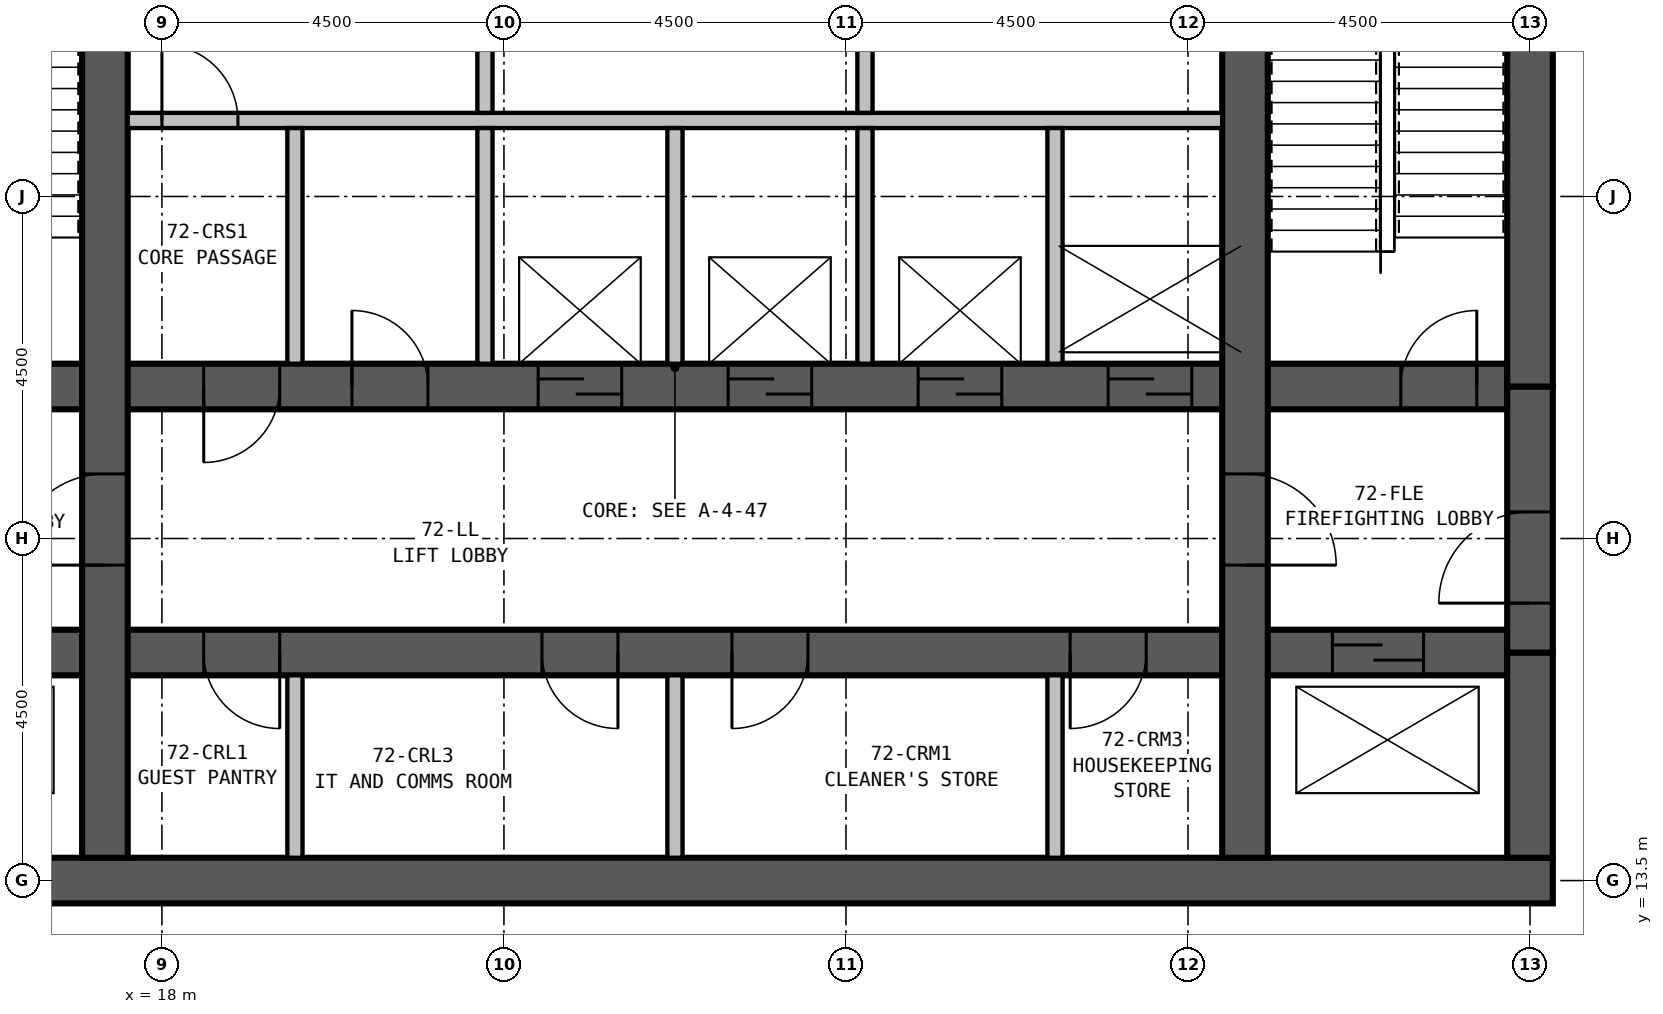
"""IFC4 building model, lengths in metres.
Left out: names, types, materials, properties, quantities, classifications, styles, units other than length and angle.
Written with IfcOpenShell. Run it as: python <this file> out.ifc"""

import sys

from ifc_helpers import new_model, si_unit, direction, frame, frame_2d, origin, place, context, subcontext, project, spatial, rectangle, extrude, element, fill, save


model = new_model("IFC4")
c1 = context("Model", 3, precision=1e-05, world=origin(), true_north=direction((0.0, 1.0)))
c2 = subcontext(c1, "Body", "Model", "MODEL_VIEW")
j1 = project(units=[si_unit("LENGTHUNIT", "METRE"), si_unit("PLANEANGLEUNIT", "RADIAN")], contexts=[c1])
p1 = place(None, origin())
s1 = spatial("IfcSite", under=j1, at=p1, CompositionType="ELEMENT")
p2 = place(p1, origin())
s2 = spatial("IfcBuilding", under=s1, at=p2, CompositionType="ELEMENT")
p3 = place(p2, frame((0.0, 0.0, 281.9)))
s3 = spatial("IfcBuildingStorey", under=s2, at=p3, CompositionType="ELEMENT", Elevation=281.9)
p4 = place(p3, frame((13.2, 13.5, 0.0), z_axis=(0.0, 0.0, 1.0), x_axis=(1.0, 0.0, 0.0)))
e1 = element("IfcWall", 1, at=p4, inside=s3, PredefinedType="SHEAR", context=c2, shape_type="SweptSolid", body=[
    extrude(rectangle(XDim=23.1, YDim=0.6, at=frame_2d((11.55, 0.0))), origin(), (0.0, 0.0, 1.0), 3.9),
])
p5 = place(p3, frame((17.25, 13.8, 0.0), z_axis=(0.0, 0.0, 1.0), x_axis=(0.0, 1.0, 0.0)))
e2 = element("IfcWall", 2, at=p5, inside=s3, PredefinedType="SHEAR", context=c2, shape_type="SweptSolid", body=[
    extrude(rectangle(XDim=12.9, YDim=0.6, at=frame_2d((6.45, 0.0))), origin(), (0.0, 0.0, 1.0), 3.9),
])
p6 = place(p5, frame((3.85, 0.0, 0.0)))
e3 = element("IfcOpeningElement", 3, at=p6, cuts=e2, PredefinedType="OPENING", context=c2, shape_type="SweptSolid", body=[
    extrude(rectangle(XDim=1.2, YDim=2.1, at=frame_2d((0.6, 1.05))), frame((0.0, 0.31, 0.0), z_axis=(0.0, -1.0, 0.0), x_axis=(1.0, 0.0, 0.0)), (0.0, 0.0, 1.0), 0.62),
])
p7 = place(p3, frame((32.25, 13.8, 0.0), z_axis=(0.0, 0.0, 1.0), x_axis=(0.0, 1.0, 0.0)))
e4 = element("IfcWall", 4, at=p7, inside=s3, PredefinedType="SHEAR", context=c2, shape_type="SweptSolid", body=[
    extrude(rectangle(XDim=12.9, YDim=0.6, at=frame_2d((6.45, 0.0))), origin(), (0.0, 0.0, 1.0), 3.9),
])
p8 = place(p7, frame((5.05, 0.0, 0.0), z_axis=(0.0, 0.0, 1.0), x_axis=(-1.0, 0.0, 0.0)))
e5 = element("IfcOpeningElement", 5, at=p8, cuts=e4, PredefinedType="OPENING", context=c2, shape_type="SweptSolid", body=[
    extrude(rectangle(XDim=1.2, YDim=2.1, at=frame_2d((0.6, 1.05))), frame((0.0, 0.31, 0.0), z_axis=(0.0, -1.0, 0.0), x_axis=(1.0, 0.0, 0.0)), (0.0, 0.0, 1.0), 0.62),
])
p9 = place(p3, frame((13.8, 16.5, 0.0), z_axis=(0.0, 0.0, 1.0), x_axis=(1.0, 0.0, 0.0)))
e6 = element("IfcWall", 6, at=p9, inside=s3, PredefinedType="SHEAR", context=c2, shape_type="SweptSolid", body=[
    extrude(rectangle(XDim=21.9, YDim=0.6, at=frame_2d((10.95, 0.0))), origin(), (0.0, 0.0, 1.0), 3.9),
])
p10 = place(p9, frame((5.75, 0.0, 0.0), z_axis=(0.0, 0.0, 1.0), x_axis=(-1.0, 0.0, 0.0)))
e7 = element("IfcOpeningElement", 7, at=p10, cuts=e6, PredefinedType="OPENING", context=c2, shape_type="SweptSolid", body=[
    extrude(rectangle(XDim=1.0, YDim=2.1, at=frame_2d((0.5, 1.05))), frame((0.0, 0.31, 0.0), z_axis=(0.0, -1.0, 0.0), x_axis=(1.0, 0.0, 0.0)), (0.0, 0.0, 1.0), 0.62),
])
p11 = place(p9, frame((10.2, 0.0, 0.0), z_axis=(0.0, 0.0, 1.0), x_axis=(-1.0, 0.0, 0.0)))
e8 = element("IfcOpeningElement", 8, at=p11, cuts=e6, PredefinedType="OPENING", context=c2, shape_type="SweptSolid", body=[
    extrude(rectangle(XDim=1.0, YDim=2.1, at=frame_2d((0.5, 1.05))), frame((0.0, 0.31, 0.0), z_axis=(0.0, -1.0, 0.0), x_axis=(1.0, 0.0, 0.0)), (0.0, 0.0, 1.0), 0.62),
])
p12 = place(p9, frame((12.7, 0.0, 0.0), z_axis=(0.0, 0.0, 1.0), x_axis=(-1.0, 0.0, 0.0)))
e9 = element("IfcOpeningElement", 9, at=p12, cuts=e6, PredefinedType="OPENING", context=c2, shape_type="SweptSolid", body=[
    extrude(rectangle(XDim=1.0, YDim=2.1, at=frame_2d((0.5, 1.05))), frame((0.0, 0.31, 0.0), z_axis=(0.0, -1.0, 0.0), x_axis=(1.0, 0.0, 0.0)), (0.0, 0.0, 1.0), 0.62),
])
p13 = place(p9, frame((17.15, 0.0, 0.0), z_axis=(0.0, 0.0, 1.0), x_axis=(-1.0, 0.0, 0.0)))
e10 = element("IfcOpeningElement", 10, at=p13, cuts=e6, PredefinedType="OPENING", context=c2, shape_type="SweptSolid", body=[
    extrude(rectangle(XDim=1.0, YDim=2.1, at=frame_2d((0.5, 1.05))), frame((0.0, 0.31, 0.0), z_axis=(0.0, -1.0, 0.0), x_axis=(1.0, 0.0, 0.0)), (0.0, 0.0, 1.0), 0.62),
])
p14 = place(p9, frame((0.6, 0.0, 0.0)))
e11 = element("IfcOpeningElement", 11, at=p14, cuts=e6, PredefinedType="OPENING", context=c2, shape_type="SweptSolid", body=[
    extrude(rectangle(XDim=1.2, YDim=2.1, at=frame_2d((0.6, 1.05))), frame((0.0, 0.31, 0.0), z_axis=(0.0, -1.0, 0.0), x_axis=(1.0, 0.0, 0.0)), (0.0, 0.0, 1.0), 0.62),
])
p15 = place(p9, frame((19.6, 0.0, 0.0)))
e12 = element("IfcOpeningElement", 12, at=p15, cuts=e6, PredefinedType="OPENING", context=c2, shape_type="SweptSolid", body=[
    extrude(rectangle(XDim=1.2, YDim=2.1, at=frame_2d((0.6, 1.05))), frame((0.0, 0.31, 0.0), z_axis=(0.0, -1.0, 0.0), x_axis=(1.0, 0.0, 0.0)), (0.0, 0.0, 1.0), 0.62),
])
p16 = place(p3, frame((13.8, 20.0, 0.0), z_axis=(0.0, 0.0, 1.0), x_axis=(1.0, 0.0, 0.0)))
e13 = element("IfcWall", 13, at=p16, inside=s3, PredefinedType="SHEAR", context=c2, shape_type="SweptSolid", body=[
    extrude(rectangle(XDim=21.9, YDim=0.6, at=frame_2d((10.95, 0.0))), origin(), (0.0, 0.0, 1.0), 3.9),
])
p17 = place(p16, frame((0.5, 0.0, 0.0)))
e14 = element("IfcOpeningElement", 14, at=p17, cuts=e13, PredefinedType="OPENING", context=c2, shape_type="SweptSolid", body=[
    extrude(rectangle(XDim=1.0, YDim=2.1, at=frame_2d((0.5, 1.05))), frame((0.0, 0.31, 0.0), z_axis=(0.0, -1.0, 0.0), x_axis=(1.0, 0.0, 0.0)), (0.0, 0.0, 1.0), 0.62),
])
p18 = place(p16, frame((20.5, 0.0, 0.0)))
e15 = element("IfcOpeningElement", 15, at=p18, cuts=e13, PredefinedType="OPENING", context=c2, shape_type="SweptSolid", body=[
    extrude(rectangle(XDim=1.0, YDim=2.1, at=frame_2d((0.5, 1.05))), frame((0.0, 0.31, 0.0), z_axis=(0.0, -1.0, 0.0), x_axis=(1.0, 0.0, 0.0)), (0.0, 0.0, 1.0), 0.62),
])
p19 = place(p16, frame((9.15, 0.0, 0.0)))
e16 = element("IfcOpeningElement", 16, at=p19, cuts=e13, PredefinedType="OPENING", context=c2, shape_type="SweptSolid", body=[
    extrude(rectangle(XDim=1.1, YDim=2.1, at=frame_2d((0.55, 1.05))), frame((0.0, 0.31, 0.0), z_axis=(0.0, -1.0, 0.0), x_axis=(1.0, 0.0, 0.0)), (0.0, 0.0, 1.0), 0.62),
])
p20 = place(p16, frame((11.65, 0.0, 0.0)))
e17 = element("IfcOpeningElement", 17, at=p20, cuts=e13, PredefinedType="OPENING", context=c2, shape_type="SweptSolid", body=[
    extrude(rectangle(XDim=1.1, YDim=2.1, at=frame_2d((0.55, 1.05))), frame((0.0, 0.31, 0.0), z_axis=(0.0, -1.0, 0.0), x_axis=(1.0, 0.0, 0.0)), (0.0, 0.0, 1.0), 0.62),
])
p21 = place(p16, frame((14.15, 0.0, 0.0)))
e18 = element("IfcOpeningElement", 18, at=p21, cuts=e13, PredefinedType="OPENING", context=c2, shape_type="SweptSolid", body=[
    extrude(rectangle(XDim=1.1, YDim=2.1, at=frame_2d((0.55, 1.05))), frame((0.0, 0.31, 0.0), z_axis=(0.0, -1.0, 0.0), x_axis=(1.0, 0.0, 0.0)), (0.0, 0.0, 1.0), 0.62),
])
p22 = place(p16, frame((16.65, 0.0, 0.0)))
e19 = element("IfcOpeningElement", 19, at=p22, cuts=e13, PredefinedType="OPENING", context=c2, shape_type="SweptSolid", body=[
    extrude(rectangle(XDim=1.1, YDim=2.1, at=frame_2d((0.55, 1.05))), frame((0.0, 0.31, 0.0), z_axis=(0.0, -1.0, 0.0), x_axis=(1.0, 0.0, 0.0)), (0.0, 0.0, 1.0), 0.62),
])
p23 = place(p16, frame((5.75, 0.0, 0.0), z_axis=(0.0, 0.0, 1.0), x_axis=(-1.0, 0.0, 0.0)))
e20 = element("IfcOpeningElement", 20, at=p23, cuts=e13, PredefinedType="OPENING", context=c2, shape_type="SweptSolid", body=[
    extrude(rectangle(XDim=1.0, YDim=2.1, at=frame_2d((0.5, 1.05))), frame((0.0, 0.31, 0.0), z_axis=(0.0, -1.0, 0.0), x_axis=(1.0, 0.0, 0.0)), (0.0, 0.0, 1.0), 0.62),
])
p24 = place(p16, frame((6.7, 0.0, 0.0)))
e21 = element("IfcOpeningElement", 21, at=p24, cuts=e13, PredefinedType="OPENING", context=c2, shape_type="SweptSolid", body=[
    extrude(rectangle(XDim=1.0, YDim=2.1, at=frame_2d((0.5, 1.05))), frame((0.0, 0.31, 0.0), z_axis=(0.0, -1.0, 0.0), x_axis=(1.0, 0.0, 0.0)), (0.0, 0.0, 1.0), 0.62),
])
p25 = place(p3, frame((36.0, 13.8, 0.0), z_axis=(0.0, 0.0, 1.0), x_axis=(0.0, 1.0, 0.0)))
e22 = element("IfcWall", 22, at=p25, inside=s3, PredefinedType="SHEAR", context=c2, shape_type="SweptSolid", body=[
    extrude(rectangle(XDim=2.7, YDim=0.6, at=frame_2d((1.35, 0.0))), origin(), (0.0, 0.0, 1.0), 3.9),
])
p26 = place(p3, frame((36.0, 16.5, 0.0), z_axis=(0.0, 0.0, 1.0), x_axis=(0.0, 1.0, 0.0)))
e23 = element("IfcWall", 23, at=p26, inside=s3, PredefinedType="SHEAR", context=c2, shape_type="SweptSolid", body=[
    extrude(rectangle(XDim=3.5, YDim=0.6, at=frame_2d((1.75, 0.0))), origin(), (0.0, 0.0, 1.0), 3.9),
])
p27 = place(p26, frame((0.65, 0.0, 0.0)))
e24 = element("IfcOpeningElement", 24, at=p27, cuts=e23, PredefinedType="OPENING", context=c2, shape_type="SweptSolid", body=[
    extrude(rectangle(XDim=1.2, YDim=2.1, at=frame_2d((0.6, 1.05))), frame((0.0, 0.31, 0.0), z_axis=(0.0, -1.0, 0.0), x_axis=(1.0, 0.0, 0.0)), (0.0, 0.0, 1.0), 0.62),
])
p28 = place(p3, frame((36.0, 20.0, 0.0), z_axis=(0.0, 0.0, 1.0), x_axis=(0.0, 1.0, 0.0)))
e25 = element("IfcWall", 25, at=p28, inside=s3, PredefinedType="SHEAR", context=c2, shape_type="SweptSolid", body=[
    extrude(rectangle(XDim=6.7, YDim=0.6, at=frame_2d((3.35, 0.0))), origin(), (0.0, 0.0, 1.0), 3.9),
])
p29 = place(p3, frame((19.75, 13.8, 0.0), z_axis=(0.0, 0.0, 1.0), x_axis=(0.0, 1.0, 0.0)))
e26 = element("IfcWall", 26, at=p29, inside=s3, PredefinedType="PARTITIONING", context=c2, shape_type="SweptSolid", body=[
    extrude(rectangle(XDim=2.4, YDim=0.2, at=frame_2d((1.2, 0.0))), origin(), (0.0, 0.0, 1.0), 3.65),
])
for number, where, z_axis, x_axis in (
    (27, (19.75, 20.3, 0.0), (0.0, 0.0, 1.0), (0.0, 1.0, 0.0)),
    (28, (22.25, 20.3, 0.0), (0.0, 0.0, 1.0), (0.0, 1.0, 0.0)),
):
    element("IfcWall", number, at=place(p3, frame(where, z_axis=z_axis, x_axis=x_axis)), inside=s3, PredefinedType="PARTITIONING", context=c2, shape_type="SweptSolid", body=[
        extrude(rectangle(XDim=3.1, YDim=0.2, at=frame_2d((1.55, 0.0))), origin(), (0.0, 0.0, 1.0), 3.65),
    ])
p30 = place(p3, frame((24.75, 13.8, 0.0), z_axis=(0.0, 0.0, 1.0), x_axis=(0.0, 1.0, 0.0)))
e29 = element("IfcWall", 29, at=p30, inside=s3, PredefinedType="PARTITIONING", context=c2, shape_type="SweptSolid", body=[
    extrude(rectangle(XDim=2.4, YDim=0.2, at=frame_2d((1.2, 0.0))), origin(), (0.0, 0.0, 1.0), 3.65),
])
for number, where, z_axis, x_axis in (
    (30, (24.75, 20.3, 0.0), (0.0, 0.0, 1.0), (0.0, 1.0, 0.0)),
    (31, (27.25, 20.3, 0.0), (0.0, 0.0, 1.0), (0.0, 1.0, 0.0)),
):
    element("IfcWall", number, at=place(p3, frame(where, z_axis=z_axis, x_axis=x_axis)), inside=s3, PredefinedType="PARTITIONING", context=c2, shape_type="SweptSolid", body=[
        extrude(rectangle(XDim=3.1, YDim=0.2, at=frame_2d((1.55, 0.0))), origin(), (0.0, 0.0, 1.0), 3.65),
    ])
p31 = place(p3, frame((29.75, 13.8, 0.0), z_axis=(0.0, 0.0, 1.0), x_axis=(0.0, 1.0, 0.0)))
e32 = element("IfcWall", 32, at=p31, inside=s3, PredefinedType="PARTITIONING", context=c2, shape_type="SweptSolid", body=[
    extrude(rectangle(XDim=2.4, YDim=0.2, at=frame_2d((1.2, 0.0))), origin(), (0.0, 0.0, 1.0), 3.65),
])
p32 = place(p3, frame((29.75, 20.3, 0.0), z_axis=(0.0, 0.0, 1.0), x_axis=(0.0, 1.0, 0.0)))
e33 = element("IfcWall", 33, at=p32, inside=s3, PredefinedType="PARTITIONING", context=c2, shape_type="SweptSolid", body=[
    extrude(rectangle(XDim=3.1, YDim=0.2, at=frame_2d((1.55, 0.0))), origin(), (0.0, 0.0, 1.0), 3.65),
])
p33 = place(p3, frame((17.55, 23.5, 0.0), z_axis=(0.0, 0.0, 1.0), x_axis=(1.0, 0.0, 0.0)))
e34 = element("IfcWall", 34, at=p33, inside=s3, PredefinedType="PARTITIONING", context=c2, shape_type="SweptSolid", body=[
    extrude(rectangle(XDim=14.4, YDim=0.2, at=frame_2d((7.2, 0.0))), origin(), (0.0, 0.0, 1.0), 3.65),
])
p34 = place(p33, frame((0.45, 0.0, 0.0)))
e35 = element("IfcOpeningElement", 35, at=p34, cuts=e34, PredefinedType="OPENING", context=c2, shape_type="SweptSolid", body=[
    extrude(rectangle(XDim=1.0, YDim=2.1, at=frame_2d((0.5, 1.05))), frame((0.0, 0.11, 0.0), z_axis=(0.0, -1.0, 0.0), x_axis=(1.0, 0.0, 0.0)), (0.0, 0.0, 1.0), 0.22),
])
for number, where, z_axis, x_axis in (
    (36, (22.25, 23.6, 0.0), (0.0, 0.0, 1.0), (0.0, 1.0, 0.0)),
    (37, (27.25, 23.6, 0.0), (0.0, 0.0, 1.0), (0.0, 1.0, 0.0)),
):
    element("IfcWall", number, at=place(p3, frame(where, z_axis=z_axis, x_axis=x_axis)), inside=s3, PredefinedType="PARTITIONING", context=c2, shape_type="SweptSolid", body=[
        extrude(rectangle(XDim=3.1, YDim=0.2, at=frame_2d((1.55, 0.0))), origin(), (0.0, 0.0, 1.0), 3.65),
    ])
p35 = place(p34, origin())
e38 = element("IfcDoor", 38, at=p35, inside=s3, OperationType="SINGLE_SWING_LEFT", PredefinedType="DOOR", context=c2, shape_type="SweptSolid", body=[
    extrude(rectangle(XDim=1.0, YDim=2.1, at=frame_2d((0.5, 1.05))), frame((0.0, 0.025, 0.0), z_axis=(0.0, -1.0, 0.0), x_axis=(1.0, 0.0, 0.0)), (0.0, 0.0, 1.0), 0.05),
])
fill(e35, e38)
p36 = place(p27, origin())
e39 = element("IfcDoor", 39, at=p36, inside=s3, OperationType="SINGLE_SWING_LEFT", PredefinedType="DOOR", context=c2, shape_type="SweptSolid", body=[
    extrude(rectangle(XDim=1.2, YDim=2.1, at=frame_2d((0.6, 1.05))), frame((0.0, 0.3, 0.0), z_axis=(0.0, -1.0, 0.0), x_axis=(1.0, 0.0, 0.0)), (0.0, 0.0, 1.0), 0.6),
])
fill(e24, e39)
p37 = place(p6, origin())
e40 = element("IfcDoor", 40, at=p37, inside=s3, OperationType="SINGLE_SWING_LEFT", PredefinedType="DOOR", context=c2, shape_type="SweptSolid", body=[
    extrude(rectangle(XDim=1.2, YDim=2.1, at=frame_2d((0.6, 1.05))), frame((0.0, 0.3, 0.0), z_axis=(0.0, -1.0, 0.0), x_axis=(1.0, 0.0, 0.0)), (0.0, 0.0, 1.0), 0.6),
])
fill(e3, e40)
p38 = place(p8, origin())
e41 = element("IfcDoor", 41, at=p38, inside=s3, OperationType="SINGLE_SWING_RIGHT", PredefinedType="DOOR", context=c2, shape_type="SweptSolid", body=[
    extrude(rectangle(XDim=1.2, YDim=2.1, at=frame_2d((0.6, 1.05))), frame((0.0, 0.3, 0.0), z_axis=(0.0, -1.0, 0.0), x_axis=(1.0, 0.0, 0.0)), (0.0, 0.0, 1.0), 0.6),
])
fill(e5, e41)
p39 = place(p18, origin())
e42 = element("IfcDoor", 42, at=p39, inside=s3, OperationType="SINGLE_SWING_RIGHT", PredefinedType="DOOR", context=c2, shape_type="SweptSolid", body=[
    extrude(rectangle(XDim=1.0, YDim=2.1, at=frame_2d((0.5, 1.05))), frame((0.0, 0.3, 0.0), z_axis=(0.0, -1.0, 0.0), x_axis=(1.0, 0.0, 0.0)), (0.0, 0.0, 1.0), 0.6),
])
fill(e15, e42)
p40 = place(p19, origin())
e43 = element("IfcDoor", 43, at=p40, inside=s3, OperationType="SLIDING_TO_LEFT", PredefinedType="DOOR", context=c2, shape_type="SweptSolid", body=[
    extrude(rectangle(XDim=1.1, YDim=2.1, at=frame_2d((0.55, 1.05))), frame((0.0, 0.3, 0.0), z_axis=(0.0, -1.0, 0.0), x_axis=(1.0, 0.0, 0.0)), (0.0, 0.0, 1.0), 0.6),
])
fill(e16, e43)
p41 = place(p20, origin())
e44 = element("IfcDoor", 44, at=p41, inside=s3, OperationType="SLIDING_TO_LEFT", PredefinedType="DOOR", context=c2, shape_type="SweptSolid", body=[
    extrude(rectangle(XDim=1.1, YDim=2.1, at=frame_2d((0.55, 1.05))), frame((0.0, 0.3, 0.0), z_axis=(0.0, -1.0, 0.0), x_axis=(1.0, 0.0, 0.0)), (0.0, 0.0, 1.0), 0.6),
])
fill(e17, e44)
p42 = place(p21, origin())
e45 = element("IfcDoor", 45, at=p42, inside=s3, OperationType="SLIDING_TO_LEFT", PredefinedType="DOOR", context=c2, shape_type="SweptSolid", body=[
    extrude(rectangle(XDim=1.1, YDim=2.1, at=frame_2d((0.55, 1.05))), frame((0.0, 0.3, 0.0), z_axis=(0.0, -1.0, 0.0), x_axis=(1.0, 0.0, 0.0)), (0.0, 0.0, 1.0), 0.6),
])
fill(e18, e45)
p43 = place(p22, origin())
e46 = element("IfcDoor", 46, at=p43, inside=s3, OperationType="SLIDING_TO_LEFT", PredefinedType="DOOR", context=c2, shape_type="SweptSolid", body=[
    extrude(rectangle(XDim=1.1, YDim=2.1, at=frame_2d((0.55, 1.05))), frame((0.0, 0.3, 0.0), z_axis=(0.0, -1.0, 0.0), x_axis=(1.0, 0.0, 0.0)), (0.0, 0.0, 1.0), 0.6),
])
fill(e19, e46)
p44 = place(p10, origin())
e47 = element("IfcDoor", 47, at=p44, inside=s3, OperationType="SINGLE_SWING_LEFT", PredefinedType="DOOR", context=c2, shape_type="SweptSolid", body=[
    extrude(rectangle(XDim=1.0, YDim=2.1, at=frame_2d((0.5, 1.05))), frame((0.0, 0.3, 0.0), z_axis=(0.0, -1.0, 0.0), x_axis=(1.0, 0.0, 0.0)), (0.0, 0.0, 1.0), 0.6),
])
fill(e7, e47)
p45 = place(p11, origin())
e48 = element("IfcDoor", 48, at=p45, inside=s3, OperationType="SINGLE_SWING_LEFT", PredefinedType="DOOR", context=c2, shape_type="SweptSolid", body=[
    extrude(rectangle(XDim=1.0, YDim=2.1, at=frame_2d((0.5, 1.05))), frame((0.0, 0.3, 0.0), z_axis=(0.0, -1.0, 0.0), x_axis=(1.0, 0.0, 0.0)), (0.0, 0.0, 1.0), 0.6),
])
fill(e8, e48)
p46 = place(p12, origin())
e49 = element("IfcDoor", 49, at=p46, inside=s3, OperationType="SINGLE_SWING_RIGHT", PredefinedType="DOOR", context=c2, shape_type="SweptSolid", body=[
    extrude(rectangle(XDim=1.0, YDim=2.1, at=frame_2d((0.5, 1.05))), frame((0.0, 0.3, 0.0), z_axis=(0.0, -1.0, 0.0), x_axis=(1.0, 0.0, 0.0)), (0.0, 0.0, 1.0), 0.6),
])
fill(e9, e49)
p47 = place(p13, origin())
e50 = element("IfcDoor", 50, at=p47, inside=s3, OperationType="SINGLE_SWING_RIGHT", PredefinedType="DOOR", context=c2, shape_type="SweptSolid", body=[
    extrude(rectangle(XDim=1.0, YDim=2.1, at=frame_2d((0.5, 1.05))), frame((0.0, 0.3, 0.0), z_axis=(0.0, -1.0, 0.0), x_axis=(1.0, 0.0, 0.0)), (0.0, 0.0, 1.0), 0.6),
])
fill(e10, e50)
p48 = place(p23, origin())
e51 = element("IfcDoor", 51, at=p48, inside=s3, OperationType="SINGLE_SWING_RIGHT", PredefinedType="DOOR", context=c2, shape_type="SweptSolid", body=[
    extrude(rectangle(XDim=1.0, YDim=2.1, at=frame_2d((0.5, 1.05))), frame((0.0, 0.3, 0.0), z_axis=(0.0, -1.0, 0.0), x_axis=(1.0, 0.0, 0.0)), (0.0, 0.0, 1.0), 0.6),
])
fill(e20, e51)
p49 = place(p24, origin())
e52 = element("IfcDoor", 52, at=p49, inside=s3, OperationType="SINGLE_SWING_LEFT", PredefinedType="DOOR", context=c2, shape_type="SweptSolid", body=[
    extrude(rectangle(XDim=1.0, YDim=2.1, at=frame_2d((0.5, 1.05))), frame((0.0, 0.3, 0.0), z_axis=(0.0, -1.0, 0.0), x_axis=(1.0, 0.0, 0.0)), (0.0, 0.0, 1.0), 0.6),
])
fill(e21, e52)
p50 = place(p15, origin())
e53 = element("IfcDoor", 53, at=p50, inside=s3, OperationType="SLIDING_TO_LEFT", PredefinedType="DOOR", context=c2, shape_type="SweptSolid", body=[
    extrude(rectangle(XDim=1.2, YDim=2.1, at=frame_2d((0.6, 1.05))), frame((0.0, 0.3, 0.0), z_axis=(0.0, -1.0, 0.0), x_axis=(1.0, 0.0, 0.0)), (0.0, 0.0, 1.0), 0.6),
])
fill(e12, e53)
save(model, sys.argv[1])
